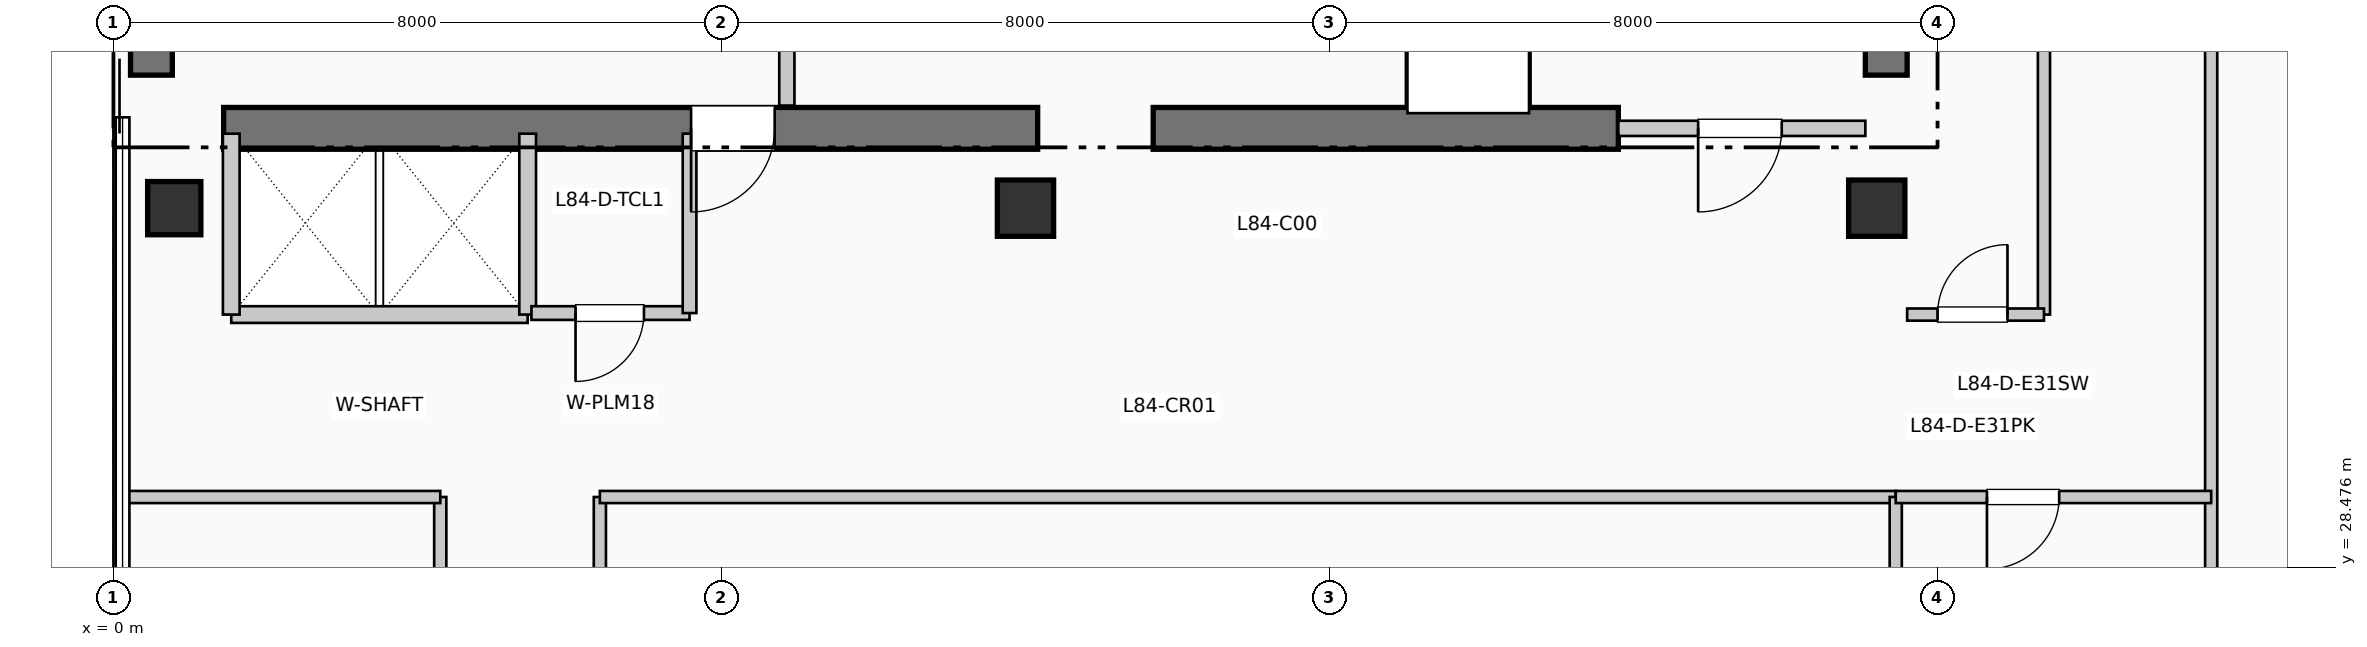
"""IFC4 building model, lengths in metres.
Left out: names, types, materials, properties, quantities, classifications, styles, units other than length and angle.
Written with IfcOpenShell. Run it as: python <this file> out.ifc"""

import sys

from ifc_helpers import new_model, si_unit, direction, frame, frame_2d, origin, origin_2d, place, context, subcontext, project, spatial, rectangle, extrude, element, fill, save


model = new_model("IFC4")
c1 = context("Model", 3, precision=1e-05, world=origin(), true_north=direction((0.0, 1.0)))
c2 = subcontext(c1, "Body", "Model", "MODEL_VIEW")
j1 = project(units=[si_unit("LENGTHUNIT", "METRE"), si_unit("PLANEANGLEUNIT", "RADIAN")], contexts=[c1])
p1 = place(None, origin())
s1 = spatial("IfcSite", under=j1, at=p1, CompositionType="ELEMENT")
p2 = place(p1, origin())
s2 = spatial("IfcBuilding", under=s1, at=p2, CompositionType="ELEMENT")
p3 = place(p2, frame((0.0, 0.0, 343.53)))
s3 = spatial("IfcBuildingStorey", under=s2, at=p3, CompositionType="ELEMENT", Elevation=343.53)
p4 = place(p3, frame((0.5, 34.95, 0.0), z_axis=(0.0, 0.0, 1.0), x_axis=(0.0, 1.0, 0.0)))
e1 = element("IfcWall", 1, at=p4, inside=s3, PredefinedType="SHEAR", context=c2, shape_type="SweptSolid", body=[
    extrude(rectangle(XDim=7.9, YDim=0.55, at=frame_2d((3.95, 0.0))), origin(), (0.0, 0.0, 1.0), 3.96),
])
p5 = place(p3, frame((23.325, 34.95, 0.0), z_axis=(0.0, 0.0, 1.0), x_axis=(0.0, 1.0, 0.0)))
e2 = element("IfcWall", 2, at=p5, inside=s3, PredefinedType="SHEAR", context=c2, shape_type="SweptSolid", body=[
    extrude(rectangle(XDim=10.64, YDim=0.55, at=frame_2d((5.32, 0.0))), origin(), (0.0, 0.0, 1.0), 3.96),
])
p6 = place(p3, frame((1.45, 34.25, 0.0), z_axis=(0.0, 0.0, 1.0), x_axis=(1.0, 0.0, 0.0)))
e3 = element("IfcWall", 3, at=p6, inside=s3, PredefinedType="SHEAR", context=c2, shape_type="SweptSolid", body=[
    extrude(rectangle(XDim=10.71, YDim=0.55, at=frame_2d((5.355, 0.0))), origin(), (0.0, 0.0, 1.0), 3.96),
])
p7 = place(p6, frame((7.25, 0.0, 0.0), z_axis=(0.0, 0.0, 1.0), x_axis=(-1.0, 0.0, 0.0)))
e4 = element("IfcOpeningElement", 4, at=p7, cuts=e3, PredefinedType="OPENING", context=c2, shape_type="SweptSolid", body=[
    extrude(rectangle(XDim=1.1, YDim=2.15, at=frame_2d((0.55, 1.075))), frame((0.0, 0.285, 0.0), z_axis=(0.0, -1.0, 0.0), x_axis=(1.0, 0.0, 0.0)), (0.0, 0.0, 1.0), 0.57),
])
p8 = place(p3, frame((13.68, 34.25, 0.0), z_axis=(0.0, 0.0, 1.0), x_axis=(1.0, 0.0, 0.0)))
e5 = element("IfcWall", 5, at=p8, inside=s3, PredefinedType="SHEAR", context=c2, shape_type="SweptSolid", body=[
    extrude(rectangle(XDim=6.12, YDim=0.55, at=frame_2d((3.06, 0.0))), origin(), (0.0, 0.0, 1.0), 3.96),
])
p9 = place(p3, frame((0.8, 33.2, 0.0), z_axis=(0.0, 0.0, 1.0), x_axis=(1.0, 0.0, 0.0)))
e6 = element("IfcColumn", 6, at=p9, inside=s3, PredefinedType="COLUMN", context=c2, shape_type="SweptSolid", body=[
    extrude(rectangle(XDim=0.7, YDim=0.7, at=origin_2d()), origin(), (0.0, 0.0, 1.0), 3.96),
])
for number, where, z_axis, x_axis in (
    (7, (12.0, 33.2, 0.0), (0.0, 0.0, 1.0), (1.0, 0.0, 0.0)),
    (8, (23.2, 33.2, 0.0), (0.0, 0.0, 1.0), (1.0, 0.0, 0.0)),
):
    element("IfcColumn", number, at=place(p3, frame(where, z_axis=z_axis, x_axis=x_axis)), inside=s3, PredefinedType="COLUMN", context=c2, shape_type="SweptSolid", body=[
        extrude(rectangle(XDim=0.74, YDim=0.74, at=origin_2d()), origin(), (0.0, 0.0, 1.0), 3.96),
    ])
p10 = place(p3, frame((8.86, 34.55, 0.0), z_axis=(0.0, 0.0, 1.0), x_axis=(0.0, 1.0, 0.0)))
e9 = element("IfcWall", 9, at=p10, inside=s3, PredefinedType="PARTITIONING", context=c2, shape_type="SweptSolid", body=[
    extrude(rectangle(XDim=2.5, YDim=0.2, at=frame_2d((1.25, 0.0))), origin(), (0.0, 0.0, 1.0), 3.71),
])
p11 = place(p3, frame((19.8, 34.25, 0.0), z_axis=(0.0, 0.0, 1.0), x_axis=(1.0, 0.0, 0.0)))
e10 = element("IfcWall", 10, at=p11, inside=s3, PredefinedType="PARTITIONING", context=c2, shape_type="SweptSolid", body=[
    extrude(rectangle(XDim=3.25, YDim=0.2, at=frame_2d((1.625, 0.0))), origin(), (0.0, 0.0, 1.0), 3.71),
])
p12 = place(p11, frame((2.15, 0.0, 0.0), z_axis=(0.0, 0.0, 1.0), x_axis=(-1.0, 0.0, 0.0)))
e11 = element("IfcOpeningElement", 11, at=p12, cuts=e10, PredefinedType="OPENING", context=c2, shape_type="SweptSolid", body=[
    extrude(rectangle(XDim=1.1, YDim=2.15, at=frame_2d((0.55, 1.075))), frame((0.0, 0.11, 0.0), z_axis=(0.0, -1.0, 0.0), x_axis=(1.0, 0.0, 0.0)), (0.0, 0.0, 1.0), 0.22),
])
p13 = place(p3, frame((1.55, 31.8, 0.0), z_axis=(0.0, 0.0, 1.0), x_axis=(1.0, 0.0, 0.0)))
e12 = element("IfcWall", 12, at=p13, inside=s3, PredefinedType="PARTITIONING", context=c2, shape_type="SweptSolid", body=[
    extrude(rectangle(XDim=3.9, YDim=0.22, at=frame_2d((1.95, 0.0))), origin(), (0.0, 0.0, 1.0), 3.71),
])
for number, where, z_axis, x_axis in (
    (13, (1.55, 31.8, 0.0), (0.0, 0.0, 1.0), (0.0, 1.0, 0.0)),
    (14, (5.45, 31.8, 0.0), (0.0, 0.0, 1.0), (0.0, 1.0, 0.0)),
):
    element("IfcWall", number, at=place(p3, frame(where, z_axis=z_axis, x_axis=x_axis)), inside=s3, PredefinedType="PARTITIONING", context=c2, shape_type="SweptSolid", body=[
        extrude(rectangle(XDim=2.38, YDim=0.22, at=frame_2d((1.19, 0.0))), origin(), (0.0, 0.0, 1.0), 3.71),
    ])
p14 = place(p3, frame((5.5, 31.82, 0.0), z_axis=(0.0, 0.0, 1.0), x_axis=(1.0, 0.0, 0.0)))
e15 = element("IfcWall", 15, at=p14, inside=s3, PredefinedType="PLUMBINGWALL", context=c2, shape_type="SweptSolid", body=[
    extrude(rectangle(XDim=2.08, YDim=0.18, at=frame_2d((1.04, 0.0))), origin(), (0.0, 0.0, 1.0), 3.71),
])
p15 = place(p14, frame((1.48, 0.0, 0.0), z_axis=(0.0, 0.0, 1.0), x_axis=(-1.0, 0.0, 0.0)))
e16 = element("IfcOpeningElement", 16, at=p15, cuts=e15, PredefinedType="OPENING", context=c2, shape_type="SweptSolid", body=[
    extrude(rectangle(XDim=0.9, YDim=2.1, at=frame_2d((0.45, 1.05))), frame((0.0, 0.1, 0.0), z_axis=(0.0, -1.0, 0.0), x_axis=(1.0, 0.0, 0.0)), (0.0, 0.0, 1.0), 0.2),
])
p16 = place(p3, frame((7.58, 31.82, 0.0), z_axis=(0.0, 0.0, 1.0), x_axis=(0.0, 1.0, 0.0)))
e17 = element("IfcWall", 17, at=p16, inside=s3, PredefinedType="PLUMBINGWALL", context=c2, shape_type="SweptSolid", body=[
    extrude(rectangle(XDim=2.36, YDim=0.18, at=frame_2d((1.18, 0.0))), origin(), (0.0, 0.0, 1.0), 3.71),
])
p17 = place(p3, frame((4.3, 23.6, 0.0), z_axis=(0.0, 0.0, 1.0), x_axis=(0.0, 1.0, 0.0)))
e18 = element("IfcWall", 18, at=p17, inside=s3, PredefinedType="PARTITIONING", context=c2, shape_type="SweptSolid", body=[
    extrude(rectangle(XDim=5.8, YDim=0.16, at=frame_2d((2.9, 0.0))), origin(), (0.0, 0.0, 1.0), 3.71),
])
p18 = place(p17, frame((3.375, 0.0, 0.0), z_axis=(0.0, 0.0, 1.0), x_axis=(-1.0, 0.0, 0.0)))
e19 = element("IfcOpeningElement", 19, at=p18, cuts=e18, PredefinedType="OPENING", context=c2, shape_type="SweptSolid", body=[
    extrude(rectangle(XDim=0.95, YDim=2.15, at=frame_2d((0.475, 1.075))), frame((0.0, 0.09, 0.0), z_axis=(0.0, -1.0, 0.0), x_axis=(1.0, 0.0, 0.0)), (0.0, 0.0, 1.0), 0.18),
])
p19 = place(p3, frame((6.4, 23.6, 0.0), z_axis=(0.0, 0.0, 1.0), x_axis=(0.0, 1.0, 0.0)))
e20 = element("IfcWall", 20, at=p19, inside=s3, PredefinedType="PARTITIONING", context=c2, shape_type="SweptSolid", body=[
    extrude(rectangle(XDim=5.8, YDim=0.16, at=frame_2d((2.9, 0.0))), origin(), (0.0, 0.0, 1.0), 3.71),
])
p20 = place(p19, frame((2.425, 0.0, 0.0)))
e21 = element("IfcOpeningElement", 21, at=p20, cuts=e20, PredefinedType="OPENING", context=c2, shape_type="SweptSolid", body=[
    extrude(rectangle(XDim=0.95, YDim=2.15, at=frame_2d((0.475, 1.075))), frame((0.0, 0.09, 0.0), z_axis=(0.0, -1.0, 0.0), x_axis=(1.0, 0.0, 0.0)), (0.0, 0.0, 1.0), 0.18),
])
p21 = place(p3, frame((0.19, 29.4, 0.0), z_axis=(0.0, 0.0, 1.0), x_axis=(1.0, 0.0, 0.0)))
e22 = element("IfcWall", 22, at=p21, inside=s3, PredefinedType="PARTITIONING", context=c2, shape_type="SweptSolid", body=[
    extrude(rectangle(XDim=4.11, YDim=0.16, at=frame_2d((2.055, 0.0))), origin(), (0.0, 0.0, 1.0), 3.395),
])
p22 = place(p3, frame((6.4, 29.4, 0.0), z_axis=(0.0, 0.0, 1.0), x_axis=(1.0, 0.0, 0.0)))
e23 = element("IfcWall", 23, at=p22, inside=s3, PredefinedType="PARTITIONING", context=c2, shape_type="SweptSolid", body=[
    extrude(rectangle(XDim=17.05, YDim=0.16, at=frame_2d((8.525, 0.0))), origin(), (0.0, 0.0, 1.0), 3.395),
])
p23 = place(p3, frame((23.45, 5.99, 0.0), z_axis=(0.0, 0.0, 1.0), x_axis=(0.0, 1.0, 0.0)))
e24 = element("IfcWall", 24, at=p23, inside=s3, PredefinedType="PARTITIONING", context=c2, shape_type="SweptSolid", body=[
    extrude(rectangle(XDim=23.41, YDim=0.16, at=frame_2d((11.705, 0.0))), origin(), (0.0, 0.0, 1.0), 3.145),
])
p24 = place(p3, frame((25.4, 31.8, 0.0), z_axis=(0.0, 0.0, 1.0), x_axis=(0.0, 1.0, 0.0)))
e25 = element("IfcWall", 25, at=p24, inside=s3, PredefinedType="PARTITIONING", context=c2, shape_type="SweptSolid", body=[
    extrude(rectangle(XDim=14.01, YDim=0.16, at=frame_2d((7.005, 0.0))), origin(), (0.0, 0.0, 1.0), 3.71),
])
p25 = place(p3, frame((27.6, 25.19, 0.0), z_axis=(0.0, 0.0, 1.0), x_axis=(0.0, 1.0, 0.0)))
e26 = element("IfcWall", 26, at=p25, inside=s3, PredefinedType="PARTITIONING", context=c2, shape_type="SweptSolid", body=[
    extrude(rectangle(XDim=15.21, YDim=0.16, at=frame_2d((7.605, 0.0))), origin(), (0.0, 0.0, 1.0), 3.71),
])
p26 = place(p3, frame((23.45, 29.4, 0.0), z_axis=(0.0, 0.0, 1.0), x_axis=(1.0, 0.0, 0.0)))
e27 = element("IfcWall", 27, at=p26, inside=s3, PredefinedType="PARTITIONING", context=c2, shape_type="SweptSolid", body=[
    extrude(rectangle(XDim=4.15, YDim=0.16, at=frame_2d((2.075, 0.0))), origin(), (0.0, 0.0, 1.0), 3.395),
])
p27 = place(p26, frame((2.15, 0.0, 0.0), z_axis=(0.0, 0.0, 1.0), x_axis=(-1.0, 0.0, 0.0)))
e28 = element("IfcOpeningElement", 28, at=p27, cuts=e27, PredefinedType="OPENING", context=c2, shape_type="SweptSolid", body=[
    extrude(rectangle(XDim=0.95, YDim=2.15, at=frame_2d((0.475, 1.075))), frame((0.0, 0.09, 0.0), z_axis=(0.0, -1.0, 0.0), x_axis=(1.0, 0.0, 0.0)), (0.0, 0.0, 1.0), 0.18),
])
p28 = place(p3, frame((23.6, 31.8, 0.0), z_axis=(0.0, 0.0, 1.0), x_axis=(1.0, 0.0, 0.0)))
e29 = element("IfcWall", 29, at=p28, inside=s3, PredefinedType="PARTITIONING", context=c2, shape_type="SweptSolid", body=[
    extrude(rectangle(XDim=1.8, YDim=0.16, at=frame_2d((0.9, 0.0))), origin(), (0.0, 0.0, 1.0), 3.71),
])
p29 = place(p28, frame((0.4, 0.0, 0.0)))
e30 = element("IfcOpeningElement", 30, at=p29, cuts=e29, PredefinedType="OPENING", context=c2, shape_type="SweptSolid", body=[
    extrude(rectangle(XDim=0.92, YDim=2.1, at=frame_2d((0.46, 1.05))), frame((0.0, 0.09, 0.0), z_axis=(0.0, -1.0, 0.0), x_axis=(1.0, 0.0, 0.0)), (0.0, 0.0, 1.0), 0.18),
])
p30 = place(p7, origin())
e31 = element("IfcDoor", 31, at=p30, inside=s3, OperationType="SINGLE_SWING_LEFT", PredefinedType="DOOR", context=c2, shape_type="SweptSolid", body=[
    extrude(rectangle(XDim=1.1, YDim=2.15, at=frame_2d((0.55, 1.075))), frame((0.0, 0.025, 0.0), z_axis=(0.0, -1.0, 0.0), x_axis=(1.0, 0.0, 0.0)), (0.0, 0.0, 1.0), 0.05),
])
fill(e4, e31)
p31 = place(p12, origin())
e32 = element("IfcDoor", 32, at=p31, inside=s3, OperationType="SINGLE_SWING_LEFT", PredefinedType="DOOR", context=c2, shape_type="SweptSolid", body=[
    extrude(rectangle(XDim=1.1, YDim=2.15, at=frame_2d((0.55, 1.075))), frame((0.0, 0.025, 0.0), z_axis=(0.0, -1.0, 0.0), x_axis=(1.0, 0.0, 0.0)), (0.0, 0.0, 1.0), 0.05),
])
fill(e11, e32)
p32 = place(p15, origin())
e33 = element("IfcDoor", 33, at=p32, inside=s3, OperationType="SINGLE_SWING_LEFT", PredefinedType="DOOR", context=c2, shape_type="SweptSolid", body=[
    extrude(rectangle(XDim=0.9, YDim=2.1, at=frame_2d((0.45, 1.05))), frame((0.0, 0.025, 0.0), z_axis=(0.0, -1.0, 0.0), x_axis=(1.0, 0.0, 0.0)), (0.0, 0.0, 1.0), 0.05),
])
fill(e16, e33)
p33 = place(p29, origin())
e34 = element("IfcDoor", 34, at=p33, inside=s3, OperationType="SINGLE_SWING_RIGHT", PredefinedType="DOOR", context=c2, shape_type="SweptSolid", body=[
    extrude(rectangle(XDim=0.92, YDim=2.1, at=frame_2d((0.46, 1.05))), frame((0.0, 0.025, 0.0), z_axis=(0.0, -1.0, 0.0), x_axis=(1.0, 0.0, 0.0)), (0.0, 0.0, 1.0), 0.05),
])
fill(e30, e34)
p34 = place(p27, origin())
e35 = element("IfcDoor", 35, at=p34, inside=s3, OperationType="SINGLE_SWING_LEFT", PredefinedType="DOOR", context=c2, shape_type="SweptSolid", body=[
    extrude(rectangle(XDim=0.95, YDim=2.15, at=frame_2d((0.475, 1.075))), frame((0.0, 0.025, 0.0), z_axis=(0.0, -1.0, 0.0), x_axis=(1.0, 0.0, 0.0)), (0.0, 0.0, 1.0), 0.05),
])
fill(e28, e35)
save(model, sys.argv[1])
